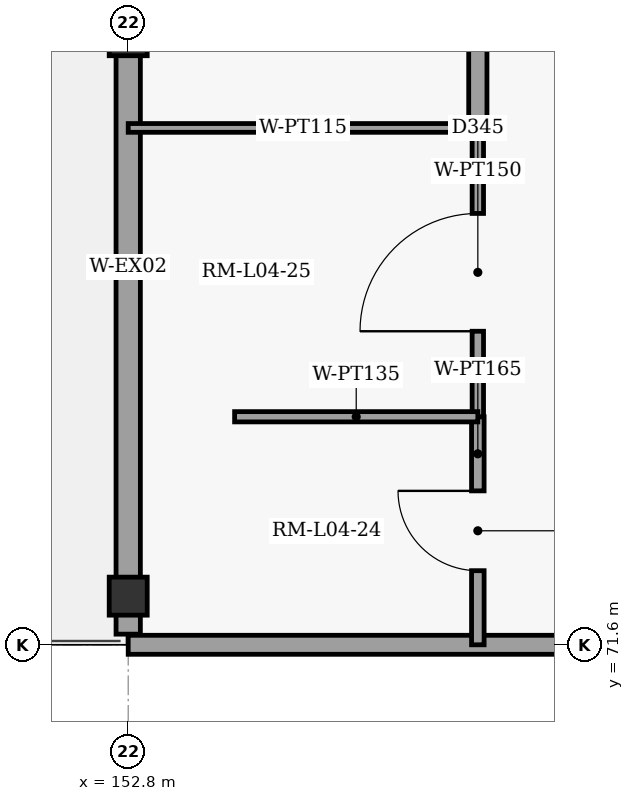
"""IFC4 building model, lengths in metres.
Left out: names, types, materials, properties, quantities, classifications, styles, units other than length and angle.
Written with IfcOpenShell. Run it as: python <this file> out.ifc"""

import sys

from ifc_helpers import new_model, si_unit, direction, frame, frame_2d, origin, origin_2d, place, context, subcontext, project, spatial, rectangle, extrude, element, fill, save


model = new_model("IFC4")
c1 = context("Model", 3, precision=1e-05, world=origin(), true_north=direction((0.0, 1.0)))
c2 = subcontext(c1, "Body", "Model", "MODEL_VIEW")
j1 = project(units=[si_unit("LENGTHUNIT", "METRE"), si_unit("PLANEANGLEUNIT", "RADIAN")], contexts=[c1])
p1 = place(None, origin())
s1 = spatial("IfcSite", under=j1, at=p1, CompositionType="ELEMENT")
p2 = place(p1, origin())
s2 = spatial("IfcBuilding", under=s1, at=p2, CompositionType="ELEMENT")
p3 = place(p2, frame((0.0, 0.0, 20.4)))
s3 = spatial("IfcBuildingStorey", under=s2, at=p3, CompositionType="ELEMENT", Elevation=20.4)
for number, where, z_axis, x_axis in (
    (1, (152.8, 72.24, 0.0), (0.0, 0.0, 1.0), (1.0, 0.0, 0.0)),
    (2, (152.8, 79.6, 0.0), (0.0, 0.0, 1.0), (1.0, 0.0, 0.0)),
):
    element("IfcColumn", number, at=place(p3, frame(where, z_axis=z_axis, x_axis=x_axis)), inside=s3, PredefinedType="COLUMN", context=c2, shape_type="SweptSolid", body=[
        extrude(rectangle(XDim=0.5, YDim=0.5, at=origin_2d()), origin(), (0.0, 0.0, 1.0), 4.5),
    ])
p4 = place(p3, frame((172.0, 71.6, 0.0), z_axis=(0.0, 0.0, 1.0), x_axis=(-1.0, 0.0, 0.0)))
e3 = element("IfcWall", 3, at=p4, inside=s3, PredefinedType="SOLIDWALL", context=c2, shape_type="SweptSolid", body=[
    extrude(rectangle(XDim=19.2, YDim=0.25, at=frame_2d((9.6, 0.0))), origin(), (0.0, 0.0, 1.0), 4.3),
])
p5 = place(p4, frame((10.0, 0.0, 0.8)))
e4 = element("IfcOpeningElement", 4, at=p5, cuts=e3, PredefinedType="OPENING", context=c2, shape_type="SweptSolid", body=[
    extrude(rectangle(XDim=1.6, YDim=2.75, at=frame_2d((0.8, 1.375))), frame((0.0, 0.135, 0.0), z_axis=(0.0, -1.0, 0.0), x_axis=(1.0, 0.0, 0.0)), (0.0, 0.0, 1.0), 0.27),
])
p6 = place(p3, frame((152.8, 71.74, 0.0), z_axis=(0.0, 0.0, 1.0), x_axis=(0.0, 1.0, 0.0)))
e5 = element("IfcWall", 5, at=p6, inside=s3, PredefinedType="SOLIDWALL", context=c2, shape_type="SweptSolid", body=[
    extrude(rectangle(XDim=15.72, YDim=0.32, at=frame_2d((7.86, 0.0))), origin(), (0.0, 0.0, 1.0), 3.45),
])
p7 = place(p6, frame((9.66, 0.0, 0.0)))
e6 = element("IfcOpeningElement", 6, at=p7, cuts=e5, PredefinedType="OPENING", context=c2, shape_type="SweptSolid", body=[
    extrude(rectangle(XDim=1.2, YDim=2.2, at=frame_2d((0.6, 1.1))), frame((0.0, 0.17, 0.0), z_axis=(0.0, -1.0, 0.0), x_axis=(1.0, 0.0, 0.0)), (0.0, 0.0, 1.0), 0.34),
])
p8 = place(p3, frame((157.4, 71.6, 0.0), z_axis=(0.0, 0.0, 1.0), x_axis=(0.0, 1.0, 0.0)))
e7 = element("IfcWall", 7, at=p8, inside=s3, PredefinedType="PARTITIONING", context=c2, shape_type="SweptSolid", body=[
    extrude(rectangle(XDim=3.0, YDim=0.165, at=frame_2d((1.5, 0.0))), origin(), (0.0, 0.0, 1.0), 4.3),
])
p9 = place(p8, frame((0.975, 0.0, 0.0)))
e8 = element("IfcOpeningElement", 8, at=p9, cuts=e7, PredefinedType="OPENING", context=c2, shape_type="SweptSolid", body=[
    extrude(rectangle(XDim=1.05, YDim=2.15, at=frame_2d((0.525, 1.075))), frame((0.0, 0.093, 0.0), z_axis=(0.0, -1.0, 0.0), x_axis=(1.0, 0.0, 0.0)), (0.0, 0.0, 1.0), 0.185),
])
p10 = place(p3, frame((157.4, 74.6, 0.0), z_axis=(0.0, 0.0, 1.0), x_axis=(0.0, 1.0, 0.0)))
e9 = element("IfcWall", 9, at=p10, inside=s3, PredefinedType="PARTITIONING", context=c2, shape_type="SweptSolid", body=[
    extrude(rectangle(XDim=3.8, YDim=0.15, at=frame_2d((1.9, 0.0))), origin(), (0.0, 0.0, 1.0), 4.3),
])
p11 = place(p10, frame((1.125, 0.0, 0.0)))
e10 = element("IfcOpeningElement", 10, at=p11, cuts=e9, PredefinedType="OPENING", context=c2, shape_type="SweptSolid", body=[
    extrude(rectangle(XDim=1.55, YDim=2.25, at=frame_2d((0.775, 1.125))), frame((0.0, 0.085, 0.0), z_axis=(0.0, -1.0, 0.0), x_axis=(1.0, 0.0, 0.0)), (0.0, 0.0, 1.0), 0.17),
])
p12 = place(p3, frame((157.4, 78.4, 0.0), z_axis=(0.0, 0.0, 1.0), x_axis=(0.0, 1.0, 0.0)))
e11 = element("IfcWall", 11, at=p12, inside=s3, PredefinedType="PARTITIONING", context=c2, shape_type="SweptSolid", body=[
    extrude(rectangle(XDim=9.2, YDim=0.24, at=frame_2d((4.6, 0.0))), origin(), (0.0, 0.0, 1.0), 4.3),
])
p13 = place(p12, frame((3.8, 0.0, 0.0)))
e12 = element("IfcOpeningElement", 12, at=p13, cuts=e11, PredefinedType="OPENING", context=c2, shape_type="SweptSolid", body=[
    extrude(rectangle(XDim=1.6, YDim=2.3, at=frame_2d((0.8, 1.15))), frame((0.0, 0.13, 0.0), z_axis=(0.0, -1.0, 0.0), x_axis=(1.0, 0.0, 0.0)), (0.0, 0.0, 1.0), 0.26),
])
p14 = place(p3, frame((154.2, 74.6, 0.0), z_axis=(0.0, 0.0, 1.0), x_axis=(1.0, 0.0, 0.0)))
e13 = element("IfcWall", 13, at=p14, inside=s3, PredefinedType="PARTITIONING", context=c2, shape_type="SweptSolid", body=[
    extrude(rectangle(XDim=3.2, YDim=0.135, at=frame_2d((1.6, 0.0))), origin(), (0.0, 0.0, 1.0), 4.3),
])
p15 = place(p3, frame((152.8, 78.4, 0.0), z_axis=(0.0, 0.0, 1.0), x_axis=(1.0, 0.0, 0.0)))
e14 = element("IfcWall", 14, at=p15, inside=s3, PredefinedType="PARTITIONING", context=c2, shape_type="SweptSolid", body=[
    extrude(rectangle(XDim=4.6, YDim=0.115, at=frame_2d((2.3, 0.0))), origin(), (0.0, 0.0, 1.0), 4.3),
])
p16 = place(p9, origin())
e15 = element("IfcDoor", 15, at=p16, inside=s3, OperationType="SINGLE_SWING_RIGHT", PredefinedType="DOOR", context=c2, shape_type="SweptSolid", body=[
    extrude(rectangle(XDim=1.05, YDim=2.15, at=frame_2d((0.525, 1.075))), frame((0.0, 0.025, 0.0), z_axis=(0.0, -1.0, 0.0), x_axis=(1.0, 0.0, 0.0)), (0.0, 0.0, 1.0), 0.05),
])
fill(e8, e15)
p17 = place(p11, origin())
e16 = element("IfcDoor", 16, at=p17, inside=s3, OperationType="SINGLE_SWING_LEFT", PredefinedType="DOOR", context=c2, shape_type="SweptSolid", body=[
    extrude(rectangle(XDim=1.55, YDim=2.25, at=frame_2d((0.775, 1.125))), frame((0.0, 0.025, 0.0), z_axis=(0.0, -1.0, 0.0), x_axis=(1.0, 0.0, 0.0)), (0.0, 0.0, 1.0), 0.05),
])
fill(e10, e16)
save(model, sys.argv[1])
